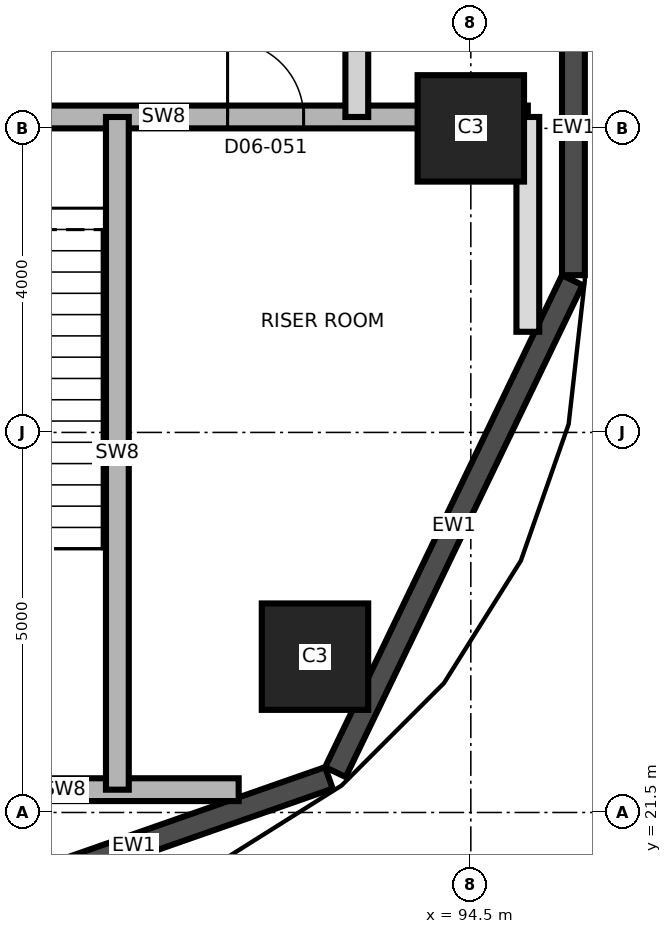
"""IFC4 building model, lengths in metres.
Left out: names, types, materials, properties, quantities, classifications, styles, units other than length and angle.
Written with IfcOpenShell. Run it as: python <this file> out.ifc"""

import sys

from ifc_helpers import new_model, si_unit, direction, frame, frame_2d, origin, origin_2d, place, context, subcontext, project, spatial, rectangle, extrude, element, fill, save


model = new_model("IFC4")
c1 = context("Model", 3, precision=1e-05, world=origin(), true_north=direction((0.0, 1.0)))
c2 = subcontext(c1, "Body", "Model", "MODEL_VIEW")
j1 = project(units=[si_unit("LENGTHUNIT", "METRE"), si_unit("PLANEANGLEUNIT", "RADIAN")], contexts=[c1])
p1 = place(None, origin())
s1 = spatial("IfcSite", under=j1, at=p1, CompositionType="ELEMENT")
p2 = place(p1, origin())
s2 = spatial("IfcBuilding", under=s1, at=p2, CompositionType="ELEMENT")
p3 = place(p2, frame((0.0, 0.0, 81.6)))
s3 = spatial("IfcBuildingStorey", under=s2, at=p3, CompositionType="ELEMENT", Elevation=81.6)
for number, where, z_axis, x_axis in (
    (1, (92.45, 23.55, 0.0), (0.0, 0.0, 1.0), (1.0, 0.0, 0.0)),
    (2, (94.5, 30.5, 0.0), (0.0, 0.0, 1.0), (1.0, 0.0, 0.0)),
):
    element("IfcColumn", number, at=place(p3, frame(where, z_axis=z_axis, x_axis=x_axis)), inside=s3, PredefinedType="COLUMN", context=c2, shape_type="SweptSolid", body=[
        extrude(rectangle(XDim=1.4, YDim=1.4, at=origin_2d()), origin(), (0.0, 0.0, 1.0), 5.5),
    ])
p4 = place(p3, frame((87.499, 20.158, 0.0), z_axis=(0.0, 0.0, 1.0), x_axis=(0.943879346284, 0.330290447423, 0.0)))
e3 = element("IfcWall", 3, at=p4, inside=s3, PredefinedType="SOLIDWALL", context=c2, shape_type="SweptSolid", body=[
    extrude(rectangle(XDim=5.439, YDim=0.3, at=frame_2d((2.72, 0.0))), origin(), (0.0, 0.0, 1.0), 5.2),
])
p5 = place(p3, frame((92.719, 22.031, 0.0), z_axis=(0.0, 0.0, 1.0), x_axis=(0.433882040461, 0.90096968593, 0.0)))
e4 = element("IfcWall", 4, at=p5, inside=s3, PredefinedType="SOLIDWALL", context=c2, shape_type="SweptSolid", body=[
    extrude(rectangle(XDim=7.183, YDim=0.3, at=frame_2d((3.592, 0.0))), origin(), (0.0, 0.0, 1.0), 5.2),
])
p6 = place(p3, frame((95.85, 28.568, 0.0), z_axis=(0.0, 0.0, 1.0), x_axis=(0.0, 1.0, 0.0)))
e5 = element("IfcWall", 5, at=p6, inside=s3, PredefinedType="SOLIDWALL", context=c2, shape_type="SweptSolid", body=[
    extrude(rectangle(XDim=3.881, YDim=0.3, at=frame_2d((1.94, 0.0))), origin(), (0.0, 0.0, 1.0), 5.2),
])
p7 = place(p3, frame((86.85, 21.8, 0.0), z_axis=(0.0, 0.0, 1.0), x_axis=(1.0, 0.0, 0.0)))
e6 = element("IfcWall", 6, at=p7, inside=s3, PredefinedType="SHEAR", context=c2, shape_type="SweptSolid", body=[
    extrude(rectangle(XDim=4.596, YDim=0.3, at=frame_2d((2.298, 0.0))), origin(), (0.0, 0.0, 1.0), 5.2),
])
p8 = place(p3, frame((85.67, 30.65, 0.0), z_axis=(0.0, 0.0, 1.0), x_axis=(1.0, 0.0, 0.0)))
e7 = element("IfcWall", 7, at=p8, inside=s3, PredefinedType="SHEAR", context=c2, shape_type="SweptSolid", body=[
    extrude(rectangle(XDim=9.58, YDim=0.3, at=frame_2d((4.79, 0.0))), origin(), (0.0, 0.0, 1.0), 5.2),
])
p9 = place(p8, frame((2.08, 0.0, 0.0)))
e8 = element("IfcOpeningElement", 8, at=p9, cuts=e7, PredefinedType="OPENING", context=c2, shape_type="SweptSolid", body=[
    extrude(rectangle(XDim=1.2, YDim=2.1, at=frame_2d((0.6, 1.05))), frame((0.0, 0.16, 0.0), z_axis=(0.0, -1.0, 0.0), x_axis=(1.0, 0.0, 0.0)), (0.0, 0.0, 1.0), 0.32),
])
p10 = place(p8, frame((5.63, 0.0, 0.0)))
e9 = element("IfcOpeningElement", 9, at=p10, cuts=e7, PredefinedType="OPENING", context=c2, shape_type="SweptSolid", body=[
    extrude(rectangle(XDim=1.0, YDim=2.1, at=frame_2d((0.5, 1.05))), frame((0.0, 0.16, 0.0), z_axis=(0.0, -1.0, 0.0), x_axis=(1.0, 0.0, 0.0)), (0.0, 0.0, 1.0), 0.32),
])
p11 = place(p3, frame((89.85, 21.8, 0.0), z_axis=(0.0, 0.0, 1.0), x_axis=(0.0, 1.0, 0.0)))
e10 = element("IfcWall", 10, at=p11, inside=s3, PredefinedType="SHEAR", context=c2, shape_type="SweptSolid", body=[
    extrude(rectangle(XDim=8.85, YDim=0.3, at=frame_2d((4.425, 0.0))), origin(), (0.0, 0.0, 1.0), 5.2),
])
p12 = place(p3, frame((93.0, 30.65, 0.0), z_axis=(0.0, 0.0, 1.0), x_axis=(0.0, 1.0, 0.0)))
e11 = element("IfcWall", 11, at=p12, inside=s3, PredefinedType="PARTITIONING", context=c2, shape_type="SweptSolid", body=[
    extrude(rectangle(XDim=2.7, YDim=0.3, at=frame_2d((1.35, 0.0))), origin(), (0.0, 0.0, 1.0), 5.2),
])
p13 = place(p3, frame((95.25, 27.824, 0.0), z_axis=(0.0, 0.0, 1.0), x_axis=(0.0, 1.0, 0.0)))
e12 = element("IfcWall", 12, at=p13, inside=s3, PredefinedType="PARTITIONING", context=c2, shape_type="SweptSolid", body=[
    extrude(rectangle(XDim=2.826, YDim=0.3, at=frame_2d((1.413, 0.0))), origin(), (0.0, 0.0, 1.0), 5.15),
])
p14 = place(p10, origin())
e13 = element("IfcDoor", 13, at=p14, inside=s3, OperationType="SINGLE_SWING_LEFT", PredefinedType="DOOR", context=c2, shape_type="SweptSolid", body=[
    extrude(rectangle(XDim=1.0, YDim=2.1, at=frame_2d((0.5, 1.05))), frame((0.0, 0.025, 0.0), z_axis=(0.0, -1.0, 0.0), x_axis=(1.0, 0.0, 0.0)), (0.0, 0.0, 1.0), 0.05),
])
fill(e9, e13)
save(model, sys.argv[1])
